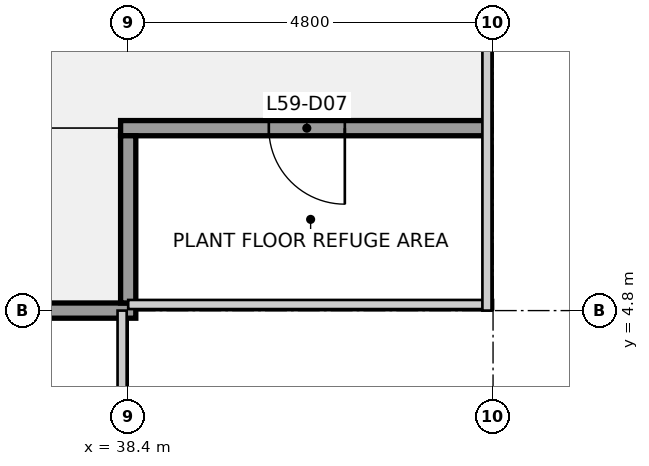
"""IFC4 building model, lengths in metres.
Left out: names, types, materials, properties, quantities, classifications, styles, units other than length and angle.
Written with IfcOpenShell. Run it as: python <this file> out.ifc"""

import sys

from ifc_helpers import new_model, si_unit, direction, frame, frame_2d, origin, place, context, subcontext, project, spatial, rectangle, extrude, element, fill, save


model = new_model("IFC4")
c1 = context("Model", 3, precision=1e-05, world=origin(), true_north=direction((0.0, 1.0)))
c2 = subcontext(c1, "Body", "Model", "MODEL_VIEW")
j1 = project(units=[si_unit("LENGTHUNIT", "METRE"), si_unit("PLANEANGLEUNIT", "RADIAN")], contexts=[c1])
p1 = place(None, origin())
s1 = spatial("IfcSite", under=j1, at=p1, CompositionType="ELEMENT")
p2 = place(p1, origin())
s2 = spatial("IfcBuilding", under=s1, at=p2, CompositionType="ELEMENT")
p3 = place(p2, frame((0.0, 0.0, 265.2)))
s3 = spatial("IfcBuildingStorey", under=s2, at=p3, CompositionType="ELEMENT", Elevation=265.2)
p4 = place(p3, frame((19.1, 4.8, 0.0), z_axis=(0.0, 0.0, 1.0), x_axis=(1.0, 0.0, 0.0)))
e1 = element("IfcWall", 1, at=p4, inside=s3, PredefinedType="PARTITIONING", context=c2, shape_type="SweptSolid", body=[
    extrude(rectangle(XDim=19.4, YDim=0.2, at=frame_2d((9.7, 0.0))), origin(), (0.0, 0.0, 1.0), 2.993),
])
p5 = place(p4, frame((2.0, 0.0, 0.0)))
e2 = element("IfcOpeningElement", 2, at=p5, cuts=e1, PredefinedType="OPENING", context=c2, shape_type="SweptSolid", body=[
    extrude(rectangle(XDim=1.0, YDim=2.1, at=frame_2d((0.5, 1.05))), frame((0.0, 0.11, 0.0), z_axis=(0.0, -1.0, 0.0), x_axis=(1.0, 0.0, 0.0)), (0.0, 0.0, 1.0), 0.22),
])
p6 = place(p4, frame((9.2, 0.0, 0.0)))
e3 = element("IfcOpeningElement", 3, at=p6, cuts=e1, PredefinedType="OPENING", context=c2, shape_type="SweptSolid", body=[
    extrude(rectangle(XDim=1.0, YDim=2.1, at=frame_2d((0.5, 1.05))), frame((0.0, 0.11, 0.0), z_axis=(0.0, -1.0, 0.0), x_axis=(1.0, 0.0, 0.0)), (0.0, 0.0, 1.0), 0.22),
])
p7 = place(p4, frame((16.4, 0.0, 0.0)))
e4 = element("IfcOpeningElement", 4, at=p7, cuts=e1, PredefinedType="OPENING", context=c2, shape_type="SweptSolid", body=[
    extrude(rectangle(XDim=1.0, YDim=2.1, at=frame_2d((0.5, 1.05))), frame((0.0, 0.11, 0.0), z_axis=(0.0, -1.0, 0.0), x_axis=(1.0, 0.0, 0.0)), (0.0, 0.0, 1.0), 0.22),
])
p8 = place(p3, frame((38.3, 7.2, 0.0), z_axis=(0.0, 0.0, 1.0), x_axis=(1.0, 0.0, 0.0)))
e5 = element("IfcWall", 5, at=p8, inside=s3, PredefinedType="PARTITIONING", context=c2, shape_type="SweptSolid", body=[
    extrude(rectangle(XDim=4.8, YDim=0.2, at=frame_2d((2.4, 0.0))), origin(), (0.0, 0.0, 1.0), 2.993),
])
p9 = place(p8, frame((1.95, 0.0, 0.0)))
e6 = element("IfcOpeningElement", 6, at=p9, cuts=e5, PredefinedType="OPENING", context=c2, shape_type="SweptSolid", body=[
    extrude(rectangle(XDim=1.0, YDim=2.1, at=frame_2d((0.5, 1.05))), frame((0.0, 0.11, 0.0), z_axis=(0.0, -1.0, 0.0), x_axis=(1.0, 0.0, 0.0)), (0.0, 0.0, 1.0), 0.22),
])
p10 = place(p3, frame((38.4, 4.9, 0.0), z_axis=(0.0, 0.0, 1.0), x_axis=(0.0, 1.0, 0.0)))
e7 = element("IfcWall", 7, at=p10, inside=s3, PredefinedType="PARTITIONING", context=c2, shape_type="SweptSolid", body=[
    extrude(rectangle(XDim=2.2, YDim=0.2, at=frame_2d((1.1, 0.0))), origin(), (0.0, 0.0, 1.0), 2.993),
])
p11 = place(p9, origin())
e8 = element("IfcDoor", 8, at=p11, inside=s3, OperationType="SINGLE_SWING_RIGHT", PredefinedType="DOOR", context=c2, shape_type="SweptSolid", body=[
    extrude(rectangle(XDim=1.0, YDim=2.1, at=frame_2d((0.5, 1.05))), frame((0.0, 0.025, 0.0), z_axis=(0.0, -1.0, 0.0), x_axis=(1.0, 0.0, 0.0)), (0.0, 0.0, 1.0), 0.05),
])
fill(e6, e8)
save(model, sys.argv[1])
